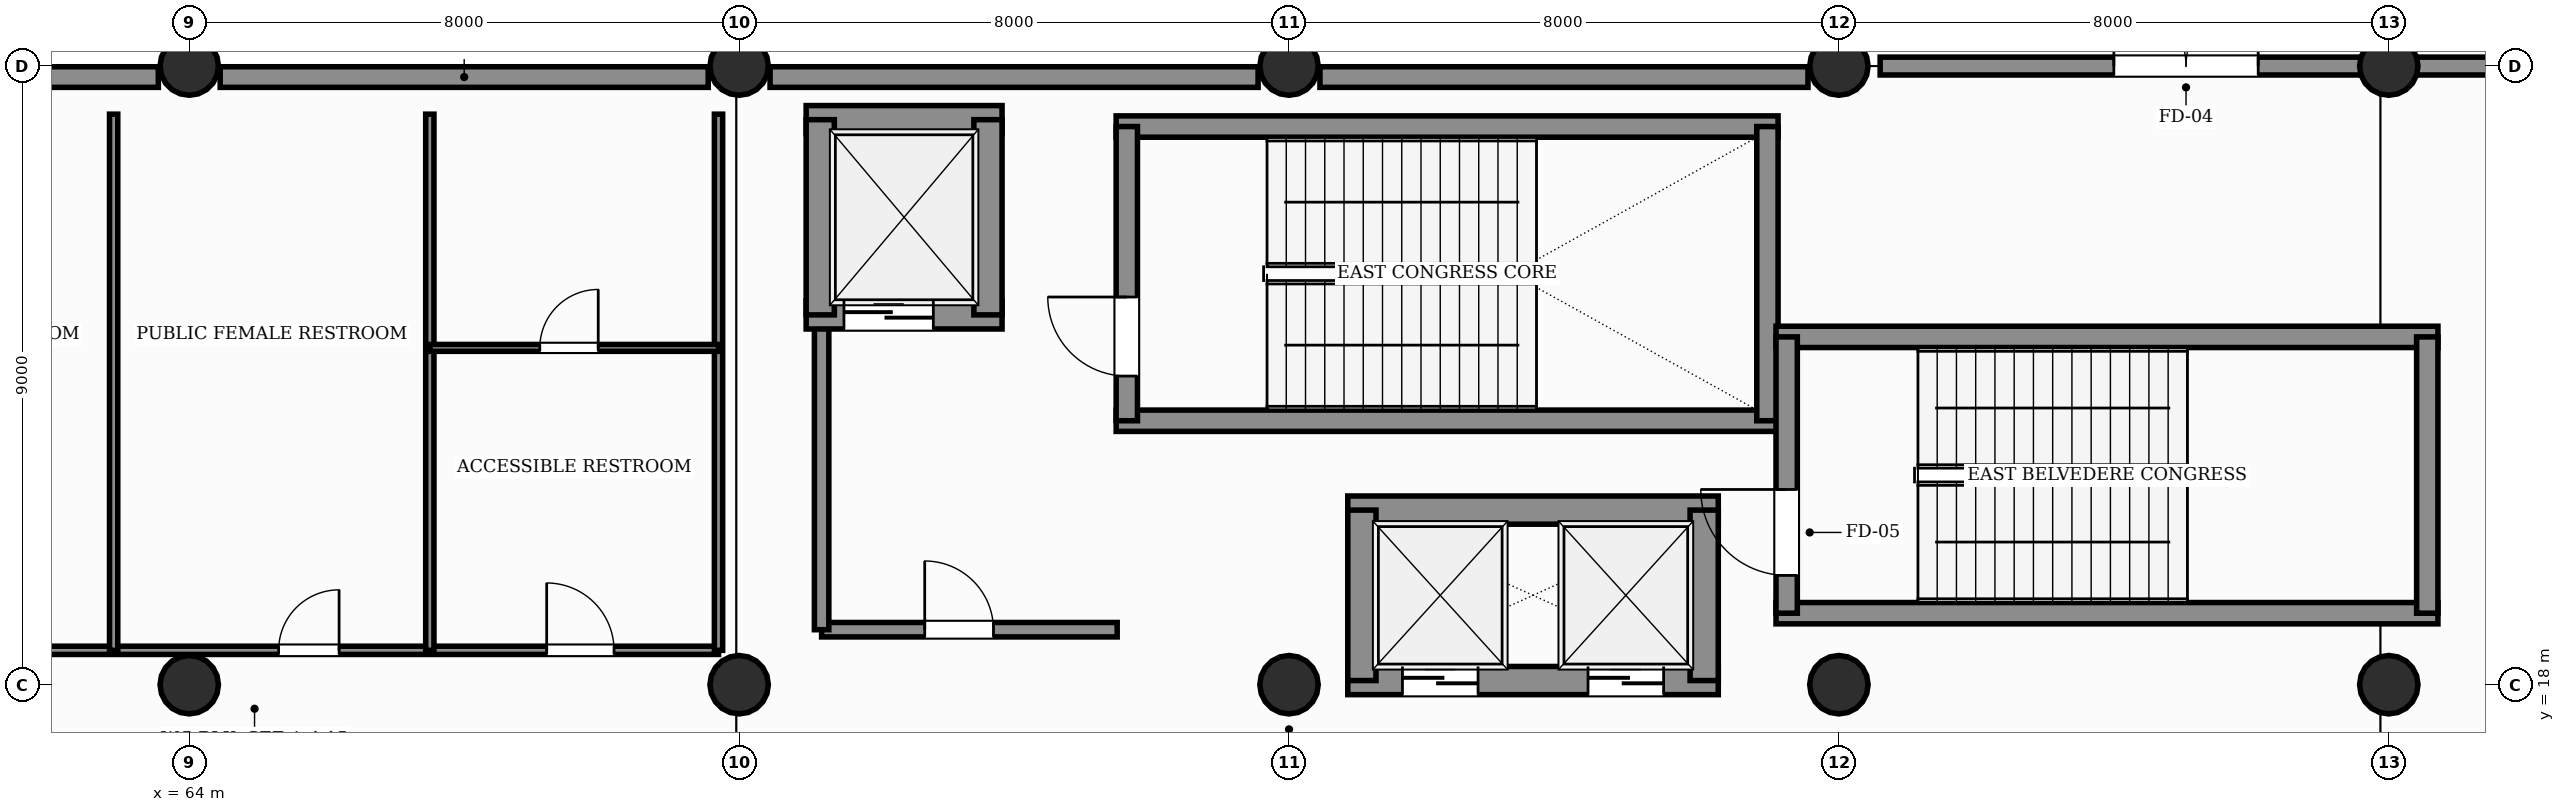
"""IFC4 building model, lengths in metres.
Left out: names, types, materials, properties, quantities, classifications, styles, units other than length and angle.
Written with IfcOpenShell. Run it as: python <this file> out.ifc"""

import sys

from ifc_helpers import new_model, si_unit, direction, frame, frame_2d, origin, origin_2d, place, context, subcontext, project, spatial, rectangle, circle, extrude, element, fill, save


model = new_model("IFC4")
c1 = context("Model", 3, precision=1e-05, world=origin(), true_north=direction((0.0, 1.0)))
c2 = subcontext(c1, "Body", "Model", "MODEL_VIEW")
j1 = project(units=[si_unit("LENGTHUNIT", "METRE"), si_unit("PLANEANGLEUNIT", "RADIAN")], contexts=[c1])
p1 = place(None, origin())
s1 = spatial("IfcSite", under=j1, at=p1, CompositionType="ELEMENT")
p2 = place(p1, origin())
s2 = spatial("IfcBuilding", under=s1, at=p2, CompositionType="ELEMENT")
p3 = place(p2, frame((0.0, 0.0, 6.0)))
s3 = spatial("IfcBuildingStorey", under=s2, at=p3, CompositionType="ELEMENT", Elevation=6.0)
for number, where, z_axis, x_axis in (
    (1, (64.0, 18.0, 0.0), (0.0, 0.0, 1.0), (1.0, 0.0, 0.0)),
    (2, (64.0, 27.0, 0.0), (0.0, 0.0, 1.0), (1.0, 0.0, 0.0)),
    (3, (72.0, 18.0, 0.0), (0.0, 0.0, 1.0), (1.0, 0.0, 0.0)),
    (4, (72.0, 27.0, 0.0), (0.0, 0.0, 1.0), (1.0, 0.0, 0.0)),
    (5, (80.0, 18.0, 0.0), (0.0, 0.0, 1.0), (1.0, 0.0, 0.0)),
    (6, (80.0, 27.0, 0.0), (0.0, 0.0, 1.0), (1.0, 0.0, 0.0)),
    (7, (88.0, 18.0, 0.0), (0.0, 0.0, 1.0), (1.0, 0.0, 0.0)),
    (8, (88.0, 27.0, 0.0), (0.0, 0.0, 1.0), (1.0, 0.0, 0.0)),
    (9, (96.0, 18.0, 0.0), (0.0, 0.0, 1.0), (1.0, 0.0, 0.0)),
    (10, (96.0, 27.0, 0.0), (0.0, 0.0, 1.0), (1.0, 0.0, 0.0)),
):
    element("IfcColumn", number, at=place(p3, frame(where, z_axis=z_axis, x_axis=x_axis)), inside=s3, PredefinedType="COLUMN", context=c2, shape_type="SweptSolid", body=[
        extrude(circle(Radius=0.425, at=origin_2d()), origin(), (0.0, 0.0, 1.0), 5.4),
    ])
for number, where, z_axis, x_axis in (
    (11, (56.45, 26.84, 0.0), (0.0, 0.0, 1.0), (1.0, 0.0, 0.0)),
    (12, (64.45, 26.84, 0.0), (0.0, 0.0, 1.0), (1.0, 0.0, 0.0)),
    (13, (72.45, 26.84, 0.0), (0.0, 0.0, 1.0), (1.0, 0.0, 0.0)),
    (14, (80.45, 26.84, 0.0), (0.0, 0.0, 1.0), (1.0, 0.0, 0.0)),
):
    element("IfcWall", number, at=place(p3, frame(where, z_axis=z_axis, x_axis=x_axis)), inside=s3, PredefinedType="SOLIDWALL", context=c2, shape_type="SweptSolid", body=[
        extrude(rectangle(XDim=7.1, YDim=0.3, at=frame_2d((3.55, 0.0))), origin(), (0.0, 0.0, 1.0), 4.18),
    ])
for number, where, z_axis, x_axis in (
    (15, (77.485, 21.84, 0.0), (0.0, 0.0, 1.0), (1.0, 0.0, 0.0)),
    (16, (77.485, 26.12, 0.0), (0.0, 0.0, 1.0), (1.0, 0.0, 0.0)),
):
    element("IfcWall", number, at=place(p3, frame(where, z_axis=z_axis, x_axis=x_axis)), inside=s3, PredefinedType="SHEAR", context=c2, shape_type="SweptSolid", body=[
        extrude(rectangle(XDim=9.63, YDim=0.31, at=frame_2d((4.815, 0.0))), origin(), (0.0, 0.0, 1.0), 5.4),
    ])
p4 = place(p3, frame((77.64, 21.84, 0.0), z_axis=(0.0, 0.0, 1.0), x_axis=(0.0, 1.0, 0.0)))
e17 = element("IfcWall", 17, at=p4, inside=s3, PredefinedType="SHEAR", context=c2, shape_type="SweptSolid", body=[
    extrude(rectangle(XDim=4.28, YDim=0.31, at=frame_2d((2.14, 0.0))), origin(), (0.0, 0.0, 1.0), 5.4),
])
p5 = place(p4, frame((0.65, 0.0, 0.0)))
e18 = element("IfcOpeningElement", 18, at=p5, cuts=e17, PredefinedType="OPENING", context=c2, shape_type="SweptSolid", body=[
    extrude(rectangle(XDim=1.15, YDim=2.2, at=frame_2d((0.575, 1.1))), frame((0.0, 0.165, 0.0), z_axis=(0.0, -1.0, 0.0), x_axis=(1.0, 0.0, 0.0)), (0.0, 0.0, 1.0), 0.33),
])
p6 = place(p3, frame((86.96, 21.84, 0.0), z_axis=(0.0, 0.0, 1.0), x_axis=(0.0, 1.0, 0.0)))
e19 = element("IfcWall", 19, at=p6, inside=s3, PredefinedType="SHEAR", context=c2, shape_type="SweptSolid", body=[
    extrude(rectangle(XDim=4.28, YDim=0.31, at=frame_2d((2.14, 0.0))), origin(), (0.0, 0.0, 1.0), 5.4),
])
p7 = place(p3, frame((73.2, 18.8, 0.0), z_axis=(0.0, 0.0, 1.0), x_axis=(1.0, 0.0, 0.0)))
e20 = element("IfcWall", 20, at=p7, inside=s3, PredefinedType="PARTITIONING", context=c2, shape_type="SweptSolid", body=[
    extrude(rectangle(XDim=4.3, YDim=0.21, at=frame_2d((2.15, 0.0))), origin(), (0.0, 0.0, 1.0), 3.85),
])
p8 = place(p7, frame((1.5, 0.0, 0.0)))
e21 = element("IfcOpeningElement", 21, at=p8, cuts=e20, PredefinedType="OPENING", context=c2, shape_type="SweptSolid", body=[
    extrude(rectangle(XDim=1.0, YDim=2.15, at=frame_2d((0.5, 1.075))), frame((0.0, 0.115, 0.0), z_axis=(0.0, -1.0, 0.0), x_axis=(1.0, 0.0, 0.0)), (0.0, 0.0, 1.0), 0.23),
])
p9 = place(p3, frame((73.2, 18.8, 0.0), z_axis=(0.0, 0.0, 1.0), x_axis=(0.0, 1.0, 0.0)))
e22 = element("IfcWall", 22, at=p9, inside=s3, PredefinedType="PARTITIONING", context=c2, shape_type="SweptSolid", body=[
    extrude(rectangle(XDim=4.6, YDim=0.21, at=frame_2d((2.3, 0.0))), origin(), (0.0, 0.0, 1.0), 3.85),
])
p10 = place(p3, frame((72.975, 23.38, 0.0), z_axis=(0.0, 0.0, 1.0), x_axis=(1.0, 0.0, 0.0)))
e23 = element("IfcWall", 23, at=p10, inside=s3, PredefinedType="SHEAR", context=c2, shape_type="SweptSolid", body=[
    extrude(rectangle(XDim=2.85, YDim=0.41, at=frame_2d((1.425, 0.0))), origin(), (0.0, 0.0, 1.0), 5.4),
])
p11 = place(p10, frame((0.55, 0.0, 0.0)))
e24 = element("IfcOpeningElement", 24, at=p11, cuts=e23, PredefinedType="OPENING", context=c2, shape_type="SweptSolid", body=[
    extrude(rectangle(XDim=1.3, YDim=2.25, at=frame_2d((0.65, 1.125))), frame((0.0, 0.215, 0.0), z_axis=(0.0, -1.0, 0.0), x_axis=(1.0, 0.0, 0.0)), (0.0, 0.0, 1.0), 0.43),
])
p12 = place(p3, frame((72.975, 26.22, 0.0), z_axis=(0.0, 0.0, 1.0), x_axis=(1.0, 0.0, 0.0)))
e25 = element("IfcWall", 25, at=p12, inside=s3, PredefinedType="SHEAR", context=c2, shape_type="SweptSolid", body=[
    extrude(rectangle(XDim=2.85, YDim=0.41, at=frame_2d((1.425, 0.0))), origin(), (0.0, 0.0, 1.0), 5.4),
])
for number, where, z_axis, x_axis in (
    (26, (73.18, 23.38, 0.0), (0.0, 0.0, 1.0), (0.0, 1.0, 0.0)),
    (27, (75.62, 23.38, 0.0), (0.0, 0.0, 1.0), (0.0, 1.0, 0.0)),
):
    element("IfcWall", number, at=place(p3, frame(where, z_axis=z_axis, x_axis=x_axis)), inside=s3, PredefinedType="SHEAR", context=c2, shape_type="SweptSolid", body=[
        extrude(rectangle(XDim=2.84, YDim=0.41, at=frame_2d((1.42, 0.0))), origin(), (0.0, 0.0, 1.0), 5.4),
    ])
p13 = place(p3, frame((80.855, 18.06, 0.0), z_axis=(0.0, 0.0, 1.0), x_axis=(1.0, 0.0, 0.0)))
e28 = element("IfcWall", 28, at=p13, inside=s3, PredefinedType="SHEAR", context=c2, shape_type="SweptSolid", body=[
    extrude(rectangle(XDim=5.39, YDim=0.41, at=frame_2d((2.695, 0.0))), origin(), (0.0, 0.0, 1.0), 5.4),
])
p14 = place(p13, frame((0.795, 0.0, 0.0)))
e29 = element("IfcOpeningElement", 29, at=p14, cuts=e28, PredefinedType="OPENING", context=c2, shape_type="SweptSolid", body=[
    extrude(rectangle(XDim=1.1, YDim=2.2, at=frame_2d((0.55, 1.1))), frame((0.0, 0.215, 0.0), z_axis=(0.0, -1.0, 0.0), x_axis=(1.0, 0.0, 0.0)), (0.0, 0.0, 1.0), 0.43),
])
p15 = place(p13, frame((3.495, 0.0, 0.0)))
e30 = element("IfcOpeningElement", 30, at=p15, cuts=e28, PredefinedType="OPENING", context=c2, shape_type="SweptSolid", body=[
    extrude(rectangle(XDim=1.1, YDim=2.2, at=frame_2d((0.55, 1.1))), frame((0.0, 0.215, 0.0), z_axis=(0.0, -1.0, 0.0), x_axis=(1.0, 0.0, 0.0)), (0.0, 0.0, 1.0), 0.43),
])
p16 = place(p3, frame((80.855, 20.54, 0.0), z_axis=(0.0, 0.0, 1.0), x_axis=(1.0, 0.0, 0.0)))
e31 = element("IfcWall", 31, at=p16, inside=s3, PredefinedType="SHEAR", context=c2, shape_type="SweptSolid", body=[
    extrude(rectangle(XDim=5.39, YDim=0.41, at=frame_2d((2.695, 0.0))), origin(), (0.0, 0.0, 1.0), 5.4),
])
for number, where, z_axis, x_axis in (
    (32, (81.06, 18.06, 0.0), (0.0, 0.0, 1.0), (0.0, 1.0, 0.0)),
    (33, (86.04, 18.06, 0.0), (0.0, 0.0, 1.0), (0.0, 1.0, 0.0)),
):
    element("IfcWall", number, at=place(p3, frame(where, z_axis=z_axis, x_axis=x_axis)), inside=s3, PredefinedType="SHEAR", context=c2, shape_type="SweptSolid", body=[
        extrude(rectangle(XDim=2.48, YDim=0.41, at=frame_2d((1.24, 0.0))), origin(), (0.0, 0.0, 1.0), 5.4),
    ])
for number, where, z_axis, x_axis in (
    (34, (87.085, 19.04, 0.0), (0.0, 0.0, 1.0), (1.0, 0.0, 0.0)),
    (35, (87.085, 23.06, 0.0), (0.0, 0.0, 1.0), (1.0, 0.0, 0.0)),
):
    element("IfcWall", number, at=place(p3, frame(where, z_axis=z_axis, x_axis=x_axis)), inside=s3, PredefinedType="SHEAR", context=c2, shape_type="SweptSolid", body=[
        extrude(rectangle(XDim=9.63, YDim=0.31, at=frame_2d((4.815, 0.0))), origin(), (0.0, 0.0, 1.0), 5.4),
    ])
p17 = place(p3, frame((87.24, 19.04, 0.0), z_axis=(0.0, 0.0, 1.0), x_axis=(0.0, 1.0, 0.0)))
e36 = element("IfcWall", 36, at=p17, inside=s3, PredefinedType="SHEAR", context=c2, shape_type="SweptSolid", body=[
    extrude(rectangle(XDim=4.02, YDim=0.31, at=frame_2d((2.01, 0.0))), origin(), (0.0, 0.0, 1.0), 5.4),
])
p18 = place(p17, frame((0.55, 0.0, 0.0)))
e37 = element("IfcOpeningElement", 37, at=p18, cuts=e36, PredefinedType="OPENING", context=c2, shape_type="SweptSolid", body=[
    extrude(rectangle(XDim=1.25, YDim=2.2, at=frame_2d((0.625, 1.1))), frame((0.0, 0.165, 0.0), z_axis=(0.0, -1.0, 0.0), x_axis=(1.0, 0.0, 0.0)), (0.0, 0.0, 1.0), 0.33),
])
p19 = place(p3, frame((96.56, 19.04, 0.0), z_axis=(0.0, 0.0, 1.0), x_axis=(0.0, 1.0, 0.0)))
e38 = element("IfcWall", 38, at=p19, inside=s3, PredefinedType="SHEAR", context=c2, shape_type="SweptSolid", body=[
    extrude(rectangle(XDim=4.02, YDim=0.31, at=frame_2d((2.01, 0.0))), origin(), (0.0, 0.0, 1.0), 5.4),
])
p20 = place(p3, frame((58.3, 18.5, 0.0), z_axis=(0.0, 0.0, 1.0), x_axis=(1.0, 0.0, 0.0)))
e39 = element("IfcWall", 39, at=p20, inside=s3, PredefinedType="PARTITIONING", context=c2, shape_type="SweptSolid", body=[
    extrude(rectangle(XDim=13.4, YDim=0.12, at=frame_2d((6.7, 0.0))), origin(), (0.0, 0.0, 1.0), 3.85),
])
p21 = place(p20, frame((1.8, 0.0, 0.0)))
e40 = element("IfcOpeningElement", 40, at=p21, cuts=e39, PredefinedType="OPENING", context=c2, shape_type="SweptSolid", body=[
    extrude(rectangle(XDim=0.88, YDim=2.1, at=frame_2d((0.44, 1.05))), frame((0.0, 0.07, 0.0), z_axis=(0.0, -1.0, 0.0), x_axis=(1.0, 0.0, 0.0)), (0.0, 0.0, 1.0), 0.14),
])
p22 = place(p20, frame((7.0, 0.0, 0.0)))
e41 = element("IfcOpeningElement", 41, at=p22, cuts=e39, PredefinedType="OPENING", context=c2, shape_type="SweptSolid", body=[
    extrude(rectangle(XDim=0.88, YDim=2.1, at=frame_2d((0.44, 1.05))), frame((0.0, 0.07, 0.0), z_axis=(0.0, -1.0, 0.0), x_axis=(1.0, 0.0, 0.0)), (0.0, 0.0, 1.0), 0.14),
])
p23 = place(p20, frame((10.9, 0.0, 0.0)))
e42 = element("IfcOpeningElement", 42, at=p23, cuts=e39, PredefinedType="OPENING", context=c2, shape_type="SweptSolid", body=[
    extrude(rectangle(XDim=0.98, YDim=2.15, at=frame_2d((0.49, 1.075))), frame((0.0, 0.07, 0.0), z_axis=(0.0, -1.0, 0.0), x_axis=(1.0, 0.0, 0.0)), (0.0, 0.0, 1.0), 0.14),
])
for number, where, z_axis, x_axis in (
    (43, (62.9, 18.5, 0.0), (0.0, 0.0, 1.0), (0.0, 1.0, 0.0)),
    (44, (67.5, 18.5, 0.0), (0.0, 0.0, 1.0), (0.0, 1.0, 0.0)),
    (45, (71.7, 18.5, 0.0), (0.0, 0.0, 1.0), (0.0, 1.0, 0.0)),
):
    element("IfcWall", number, at=place(p3, frame(where, z_axis=z_axis, x_axis=x_axis)), inside=s3, PredefinedType="PARTITIONING", context=c2, shape_type="SweptSolid", body=[
        extrude(rectangle(XDim=7.8, YDim=0.12, at=frame_2d((3.9, 0.0))), origin(), (0.0, 0.0, 1.0), 3.85),
    ])
p24 = place(p3, frame((67.5, 22.9, 0.0), z_axis=(0.0, 0.0, 1.0), x_axis=(1.0, 0.0, 0.0)))
e46 = element("IfcWall", 46, at=p24, inside=s3, PredefinedType="PARTITIONING", context=c2, shape_type="SweptSolid", body=[
    extrude(rectangle(XDim=4.2, YDim=0.1, at=frame_2d((2.1, 0.0))), origin(), (0.0, 0.0, 1.0), 3.85),
])
p25 = place(p24, frame((1.6, 0.0, 0.0)))
e47 = element("IfcOpeningElement", 47, at=p25, cuts=e46, PredefinedType="OPENING", context=c2, shape_type="SweptSolid", body=[
    extrude(rectangle(XDim=0.85, YDim=2.1, at=frame_2d((0.425, 1.05))), frame((0.0, 0.06, 0.0), z_axis=(0.0, -1.0, 0.0), x_axis=(1.0, 0.0, 0.0)), (0.0, 0.0, 1.0), 0.12),
])
p26 = place(p3, frame((88.6, 27.0, 0.0), z_axis=(0.0, 0.0, 1.0), x_axis=(1.0, 0.0, 0.0)))
e48 = element("IfcWall", 48, at=p26, inside=s3, PredefinedType="SOLIDWALL", context=c2, shape_type="SweptSolid", body=[
    extrude(rectangle(XDim=14.9, YDim=0.26, at=frame_2d((7.45, 0.0))), origin(), (0.0, 0.0, 1.0), 5.4),
])
p27 = place(p26, frame((3.4, 0.0, 0.0)))
e49 = element("IfcOpeningElement", 49, at=p27, cuts=e48, PredefinedType="OPENING", context=c2, shape_type="SweptSolid", body=[
    extrude(rectangle(XDim=2.1, YDim=2.4, at=frame_2d((1.05, 1.2))), frame((0.0, 0.14, 0.0), z_axis=(0.0, -1.0, 0.0), x_axis=(1.0, 0.0, 0.0)), (0.0, 0.0, 1.0), 0.28),
])
p28 = place(p26, frame((10.4, 0.0, 0.0)))
e50 = element("IfcOpeningElement", 50, at=p28, cuts=e48, PredefinedType="OPENING", context=c2, shape_type="SweptSolid", body=[
    extrude(rectangle(XDim=2.2, YDim=2.6, at=frame_2d((1.1, 1.3))), frame((0.0, 0.14, 0.0), z_axis=(0.0, -1.0, 0.0), x_axis=(1.0, 0.0, 0.0)), (0.0, 0.0, 1.0), 0.28),
])
p29 = place(p5, origin())
e51 = element("IfcDoor", 51, at=p29, inside=s3, OperationType="SINGLE_SWING_RIGHT", PredefinedType="DOOR", context=c2, shape_type="SweptSolid", body=[
    extrude(rectangle(XDim=1.15, YDim=2.2, at=frame_2d((0.575, 1.1))), frame((0.0, 0.025, 0.0), z_axis=(0.0, -1.0, 0.0), x_axis=(1.0, 0.0, 0.0)), (0.0, 0.0, 1.0), 0.05),
])
fill(e18, e51)
p30 = place(p8, origin())
e52 = element("IfcDoor", 52, at=p30, inside=s3, OperationType="SINGLE_SWING_LEFT", PredefinedType="DOOR", context=c2, shape_type="SweptSolid", body=[
    extrude(rectangle(XDim=1.0, YDim=2.15, at=frame_2d((0.5, 1.075))), frame((0.0, 0.025, 0.0), z_axis=(0.0, -1.0, 0.0), x_axis=(1.0, 0.0, 0.0)), (0.0, 0.0, 1.0), 0.05),
])
fill(e21, e52)
p31 = place(p11, origin())
e53 = element("IfcDoor", 53, at=p31, inside=s3, OperationType="DOUBLE_DOOR_SLIDING", PredefinedType="DOOR", context=c2, shape_type="SweptSolid", body=[
    extrude(rectangle(XDim=1.3, YDim=2.25, at=frame_2d((0.65, 1.125))), frame((0.0, 0.025, 0.0), z_axis=(0.0, -1.0, 0.0), x_axis=(1.0, 0.0, 0.0)), (0.0, 0.0, 1.0), 0.05),
])
fill(e24, e53)
p32 = place(p14, origin())
e54 = element("IfcDoor", 54, at=p32, inside=s3, OperationType="DOUBLE_DOOR_SLIDING", PredefinedType="DOOR", context=c2, shape_type="SweptSolid", body=[
    extrude(rectangle(XDim=1.1, YDim=2.2, at=frame_2d((0.55, 1.1))), frame((0.0, 0.025, 0.0), z_axis=(0.0, -1.0, 0.0), x_axis=(1.0, 0.0, 0.0)), (0.0, 0.0, 1.0), 0.05),
])
fill(e29, e54)
p33 = place(p15, origin())
e55 = element("IfcDoor", 55, at=p33, inside=s3, OperationType="DOUBLE_DOOR_SLIDING", PredefinedType="DOOR", context=c2, shape_type="SweptSolid", body=[
    extrude(rectangle(XDim=1.1, YDim=2.2, at=frame_2d((0.55, 1.1))), frame((0.0, 0.025, 0.0), z_axis=(0.0, -1.0, 0.0), x_axis=(1.0, 0.0, 0.0)), (0.0, 0.0, 1.0), 0.05),
])
fill(e30, e55)
p34 = place(p18, origin())
e56 = element("IfcDoor", 56, at=p34, inside=s3, OperationType="SINGLE_SWING_RIGHT", PredefinedType="DOOR", context=c2, shape_type="SweptSolid", body=[
    extrude(rectangle(XDim=1.25, YDim=2.2, at=frame_2d((0.625, 1.1))), frame((0.0, 0.025, 0.0), z_axis=(0.0, -1.0, 0.0), x_axis=(1.0, 0.0, 0.0)), (0.0, 0.0, 1.0), 0.05),
])
fill(e37, e56)
p35 = place(p22, origin())
e57 = element("IfcDoor", 57, at=p35, inside=s3, OperationType="SINGLE_SWING_RIGHT", PredefinedType="DOOR", context=c2, shape_type="SweptSolid", body=[
    extrude(rectangle(XDim=0.88, YDim=2.1, at=frame_2d((0.44, 1.05))), frame((0.0, 0.025, 0.0), z_axis=(0.0, -1.0, 0.0), x_axis=(1.0, 0.0, 0.0)), (0.0, 0.0, 1.0), 0.05),
])
fill(e41, e57)
p36 = place(p23, origin())
e58 = element("IfcDoor", 58, at=p36, inside=s3, OperationType="SINGLE_SWING_LEFT", PredefinedType="DOOR", context=c2, shape_type="SweptSolid", body=[
    extrude(rectangle(XDim=0.98, YDim=2.15, at=frame_2d((0.49, 1.075))), frame((0.0, 0.025, 0.0), z_axis=(0.0, -1.0, 0.0), x_axis=(1.0, 0.0, 0.0)), (0.0, 0.0, 1.0), 0.05),
])
fill(e42, e58)
p37 = place(p25, origin())
e59 = element("IfcDoor", 59, at=p37, inside=s3, OperationType="SINGLE_SWING_RIGHT", PredefinedType="DOOR", context=c2, shape_type="SweptSolid", body=[
    extrude(rectangle(XDim=0.85, YDim=2.1, at=frame_2d((0.425, 1.05))), frame((0.0, 0.025, 0.0), z_axis=(0.0, -1.0, 0.0), x_axis=(1.0, 0.0, 0.0)), (0.0, 0.0, 1.0), 0.05),
])
fill(e47, e59)
p38 = place(p27, origin())
e60 = element("IfcDoor", 60, at=p38, inside=s3, OperationType="DOUBLE_DOOR_SINGLE_SWING", PredefinedType="DOOR", context=c2, shape_type="SweptSolid", body=[
    extrude(rectangle(XDim=2.1, YDim=2.4, at=frame_2d((1.05, 1.2))), frame((0.0, 0.025, 0.0), z_axis=(0.0, -1.0, 0.0), x_axis=(1.0, 0.0, 0.0)), (0.0, 0.0, 1.0), 0.05),
])
fill(e49, e60)
save(model, sys.argv[1])
